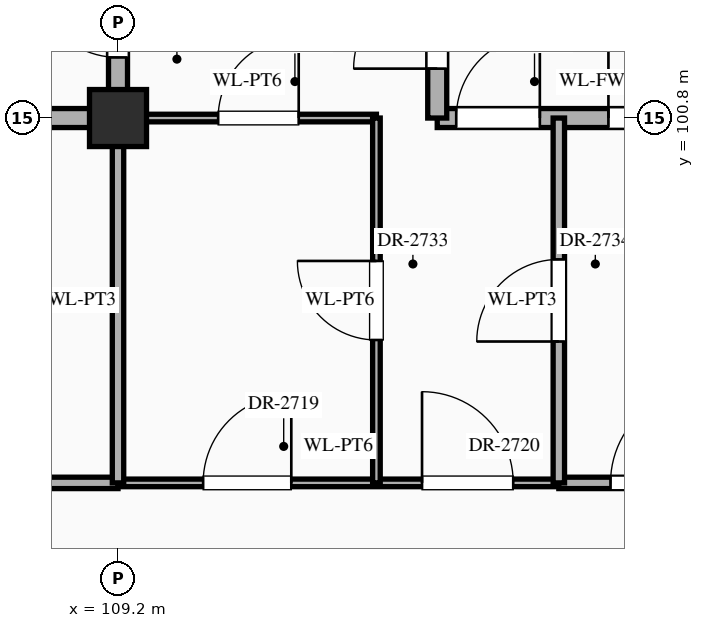
"""IFC4 building model, lengths in metres.
Left out: names, types, materials, properties, quantities, classifications, styles, units other than length and angle.
Written with IfcOpenShell. Run it as: python <this file> out.ifc"""

import sys

from ifc_helpers import new_model, si_unit, direction, frame, frame_2d, origin, origin_2d, place, context, subcontext, project, spatial, rectangle, extrude, element, fill, save


model = new_model("IFC4")
c1 = context("Model", 3, precision=1e-05, world=origin(), true_north=direction((0.0, 1.0)))
c2 = subcontext(c1, "Body", "Model", "MODEL_VIEW")
j1 = project(units=[si_unit("LENGTHUNIT", "METRE"), si_unit("PLANEANGLEUNIT", "RADIAN")], contexts=[c1])
p1 = place(None, origin())
s1 = spatial("IfcSite", under=j1, at=p1, CompositionType="ELEMENT")
p2 = place(p1, origin())
s2 = spatial("IfcBuilding", under=s1, at=p2, CompositionType="ELEMENT")
p3 = place(p2, frame((0.0, 0.0, 39.3)))
s3 = spatial("IfcBuildingStorey", under=s2, at=p3, CompositionType="ELEMENT", Elevation=39.3)
p4 = place(p3, frame((109.2, 100.8, 0.0), z_axis=(0.0, 0.0, 1.0), x_axis=(1.0, 0.0, 0.0)))
e1 = element("IfcColumn", 1, at=p4, inside=s3, PredefinedType="COLUMN", context=c2, shape_type="SweptSolid", body=[
    extrude(rectangle(XDim=0.75, YDim=0.75, at=origin_2d()), origin(), (0.0, 0.0, 1.0), 4.2),
])
p5 = place(p3, frame((89.8, 96.0, 0.0), z_axis=(0.0, 0.0, 1.0), x_axis=(1.0, 0.0, 0.0)))
e2 = element("IfcWall", 2, at=p5, inside=s3, PredefinedType="STANDARD", context=c2, shape_type="SweptSolid", body=[
    extrude(rectangle(XDim=19.4, YDim=0.15, at=frame_2d((9.7, 0.0))), origin(), (0.0, 0.0, 1.0), 3.95),
])
p6 = place(p5, frame((0.78, 0.0, 0.0)))
e3 = element("IfcOpeningElement", 3, at=p6, cuts=e2, PredefinedType="OPENING", context=c2, shape_type="SweptSolid", body=[
    extrude(rectangle(XDim=1.04, YDim=2.2, at=frame_2d((0.52, 1.1))), frame((0.0, 0.087, 0.0), z_axis=(0.0, -1.0, 0.0), x_axis=(1.0, 0.0, 0.0)), (0.0, 0.0, 1.0), 0.174),
])
p7 = place(p5, frame((6.26, 0.0, 0.0)))
e4 = element("IfcOpeningElement", 4, at=p7, cuts=e2, PredefinedType="OPENING", context=c2, shape_type="SweptSolid", body=[
    extrude(rectangle(XDim=1.08, YDim=2.25, at=frame_2d((0.54, 1.125))), frame((0.0, 0.087, 0.0), z_axis=(0.0, -1.0, 0.0), x_axis=(1.0, 0.0, 0.0)), (0.0, 0.0, 1.0), 0.174),
])
p8 = place(p5, frame((14.64, 0.0, 0.0)))
e5 = element("IfcOpeningElement", 5, at=p8, cuts=e2, PredefinedType="OPENING", context=c2, shape_type="SweptSolid", body=[
    extrude(rectangle(XDim=1.12, YDim=2.25, at=frame_2d((0.56, 1.125))), frame((0.0, 0.087, 0.0), z_axis=(0.0, -1.0, 0.0), x_axis=(1.0, 0.0, 0.0)), (0.0, 0.0, 1.0), 0.174),
])
p9 = place(p3, frame((109.2, 96.0, 0.0), z_axis=(0.0, 0.0, 1.0), x_axis=(1.0, 0.0, 0.0)))
e6 = element("IfcWall", 6, at=p9, inside=s3, PredefinedType="STANDARD", context=c2, shape_type="SweptSolid", body=[
    extrude(rectangle(XDim=5.8, YDim=0.1, at=frame_2d((2.9, 0.0))), origin(), (0.0, 0.0, 1.0), 3.95),
])
p10 = place(p9, frame((1.12, 0.0, 0.0)))
e7 = element("IfcOpeningElement", 7, at=p10, cuts=e6, PredefinedType="OPENING", context=c2, shape_type="SweptSolid", body=[
    extrude(rectangle(XDim=1.16, YDim=2.3, at=frame_2d((0.58, 1.15))), frame((0.0, 0.062, 0.0), z_axis=(0.0, -1.0, 0.0), x_axis=(1.0, 0.0, 0.0)), (0.0, 0.0, 1.0), 0.124),
])
p11 = place(p9, frame((4.0, 0.0, 0.0)))
e8 = element("IfcOpeningElement", 8, at=p11, cuts=e6, PredefinedType="OPENING", context=c2, shape_type="SweptSolid", body=[
    extrude(rectangle(XDim=1.2, YDim=2.35, at=frame_2d((0.6, 1.175))), frame((0.0, 0.062, 0.0), z_axis=(0.0, -1.0, 0.0), x_axis=(1.0, 0.0, 0.0)), (0.0, 0.0, 1.0), 0.124),
])
p12 = place(p3, frame((115.0, 96.0, 0.0), z_axis=(0.0, 0.0, 1.0), x_axis=(1.0, 0.0, 0.0)))
e9 = element("IfcWall", 9, at=p12, inside=s3, PredefinedType="STANDARD", context=c2, shape_type="SweptSolid", body=[
    extrude(rectangle(XDim=10.96, YDim=0.15, at=frame_2d((5.48, 0.0))), origin(), (0.0, 0.0, 1.0), 3.95),
])
p13 = place(p12, frame((0.68, 0.0, 0.0)))
e10 = element("IfcOpeningElement", 10, at=p13, cuts=e9, PredefinedType="OPENING", context=c2, shape_type="SweptSolid", body=[
    extrude(rectangle(XDim=1.24, YDim=2.3, at=frame_2d((0.62, 1.15))), frame((0.0, 0.087, 0.0), z_axis=(0.0, -1.0, 0.0), x_axis=(1.0, 0.0, 0.0)), (0.0, 0.0, 1.0), 0.174),
])
p14 = place(p12, frame((6.33, 0.0, 0.0)))
e11 = element("IfcOpeningElement", 11, at=p14, cuts=e9, PredefinedType="OPENING", context=c2, shape_type="SweptSolid", body=[
    extrude(rectangle(XDim=0.9, YDim=2.15, at=frame_2d((0.45, 1.075))), frame((0.0, 0.087, 0.0), z_axis=(0.0, -1.0, 0.0), x_axis=(1.0, 0.0, 0.0)), (0.0, 0.0, 1.0), 0.174),
])
p15 = place(p3, frame((96.6, 100.8, 0.0), z_axis=(0.0, 0.0, 1.0), x_axis=(1.0, 0.0, 0.0)))
e12 = element("IfcWall", 12, at=p15, inside=s3, PredefinedType="STANDARD", context=c2, shape_type="SweptSolid", body=[
    extrude(rectangle(XDim=12.6, YDim=0.25, at=frame_2d((6.3, 0.0))), origin(), (0.0, 0.0, 1.0), 3.1),
])
p16 = place(p15, frame((7.9, 0.0, 0.0)))
e13 = element("IfcOpeningElement", 13, at=p16, cuts=e12, PredefinedType="OPENING", context=c2, shape_type="SweptSolid", body=[
    extrude(rectangle(XDim=1.0, YDim=2.2, at=frame_2d((0.5, 1.1))), frame((0.0, 0.137, 0.0), z_axis=(0.0, -1.0, 0.0), x_axis=(1.0, 0.0, 0.0)), (0.0, 0.0, 1.0), 0.274),
])
p17 = place(p3, frame((109.2, 100.8, 0.0), z_axis=(0.0, 0.0, 1.0), x_axis=(1.0, 0.0, 0.0)))
e14 = element("IfcWall", 14, at=p17, inside=s3, PredefinedType="STANDARD", context=c2, shape_type="SweptSolid", body=[
    extrude(rectangle(XDim=3.4, YDim=0.1, at=frame_2d((1.7, 0.0))), origin(), (0.0, 0.0, 1.0), 3.1),
])
p18 = place(p17, frame((1.317, 0.0, 0.0)))
e15 = element("IfcOpeningElement", 15, at=p18, cuts=e14, PredefinedType="OPENING", context=c2, shape_type="SweptSolid", body=[
    extrude(rectangle(XDim=1.06, YDim=2.4, at=frame_2d((0.53, 1.2))), frame((0.0, 0.062, 0.0), z_axis=(0.0, -1.0, 0.0), x_axis=(1.0, 0.0, 0.0)), (0.0, 0.0, 1.0), 0.124),
])
p19 = place(p3, frame((113.4, 100.8, 0.0), z_axis=(0.0, 0.0, 1.0), x_axis=(1.0, 0.0, 0.0)))
e16 = element("IfcWall", 16, at=p19, inside=s3, PredefinedType="STANDARD", context=c2, shape_type="SweptSolid", body=[
    extrude(rectangle(XDim=4.2, YDim=0.25, at=frame_2d((2.1, 0.0))), origin(), (0.0, 0.0, 1.0), 3.1),
])
p20 = place(p19, frame((0.25, 0.0, 0.0)))
e17 = element("IfcOpeningElement", 17, at=p20, cuts=e16, PredefinedType="OPENING", context=c2, shape_type="SweptSolid", body=[
    extrude(rectangle(XDim=1.1, YDim=2.2, at=frame_2d((0.55, 1.1))), frame((0.0, 0.137, 0.0), z_axis=(0.0, -1.0, 0.0), x_axis=(1.0, 0.0, 0.0)), (0.0, 0.0, 1.0), 0.274),
])
p21 = place(p19, frame((2.252, 0.0, 0.0)))
e18 = element("IfcOpeningElement", 18, at=p21, cuts=e16, PredefinedType="OPENING", context=c2, shape_type="SweptSolid", body=[
    extrude(rectangle(XDim=1.0, YDim=2.2, at=frame_2d((0.5, 1.1))), frame((0.0, 0.137, 0.0), z_axis=(0.0, -1.0, 0.0), x_axis=(1.0, 0.0, 0.0)), (0.0, 0.0, 1.0), 0.274),
])
p22 = place(p3, frame((109.2, 96.0, 0.0), z_axis=(0.0, 0.0, 1.0), x_axis=(0.0, 1.0, 0.0)))
e19 = element("IfcWall", 19, at=p22, inside=s3, PredefinedType="STANDARD", context=c2, shape_type="SweptSolid", body=[
    extrude(rectangle(XDim=4.8, YDim=0.15, at=frame_2d((2.4, 0.0))), origin(), (0.0, 0.0, 1.0), 3.2),
])
p23 = place(p3, frame((109.2, 100.8, 0.0), z_axis=(0.0, 0.0, 1.0), x_axis=(0.0, 1.0, 0.0)))
e20 = element("IfcWall", 20, at=p23, inside=s3, PredefinedType="STANDARD", context=c2, shape_type="SweptSolid", body=[
    extrude(rectangle(XDim=2.4, YDim=0.25, at=frame_2d((1.2, 0.0))), origin(), (0.0, 0.0, 1.0), 3.2),
])
p24 = place(p23, frame((0.798, 0.0, 0.0)))
e21 = element("IfcOpeningElement", 21, at=p24, cuts=e20, PredefinedType="OPENING", context=c2, shape_type="SweptSolid", body=[
    extrude(rectangle(XDim=1.1, YDim=2.2, at=frame_2d((0.55, 1.1))), frame((0.0, 0.137, 0.0), z_axis=(0.0, -1.0, 0.0), x_axis=(1.0, 0.0, 0.0)), (0.0, 0.0, 1.0), 0.274),
])
p25 = place(p3, frame((112.6, 96.0, 0.0), z_axis=(0.0, 0.0, 1.0), x_axis=(0.0, 1.0, 0.0)))
e22 = element("IfcWall", 22, at=p25, inside=s3, PredefinedType="STANDARD", context=c2, shape_type="SweptSolid", body=[
    extrude(rectangle(XDim=4.8, YDim=0.1, at=frame_2d((2.4, 0.0))), origin(), (0.0, 0.0, 1.0), 3.95),
])
p26 = place(p25, frame((1.88, 0.0, 0.0)))
e23 = element("IfcOpeningElement", 23, at=p26, cuts=e22, PredefinedType="OPENING", context=c2, shape_type="SweptSolid", body=[
    extrude(rectangle(XDim=1.04, YDim=2.2, at=frame_2d((0.52, 1.1))), frame((0.0, 0.062, 0.0), z_axis=(0.0, -1.0, 0.0), x_axis=(1.0, 0.0, 0.0)), (0.0, 0.0, 1.0), 0.124),
])
p27 = place(p3, frame((113.4, 100.8, 0.0), z_axis=(0.0, 0.0, 1.0), x_axis=(0.0, 1.0, 0.0)))
e24 = element("IfcWall", 24, at=p27, inside=s3, PredefinedType="STANDARD", context=c2, shape_type="SweptSolid", body=[
    extrude(rectangle(XDim=3.6, YDim=0.25, at=frame_2d((1.8, 0.0))), origin(), (0.0, 0.0, 1.0), 3.95),
])
p28 = place(p27, frame((0.65, 0.0, 0.0)))
e25 = element("IfcOpeningElement", 25, at=p28, cuts=e24, PredefinedType="OPENING", context=c2, shape_type="SweptSolid", body=[
    extrude(rectangle(XDim=1.1, YDim=2.2, at=frame_2d((0.55, 1.1))), frame((0.0, 0.137, 0.0), z_axis=(0.0, -1.0, 0.0), x_axis=(1.0, 0.0, 0.0)), (0.0, 0.0, 1.0), 0.274),
])
p29 = place(p3, frame((115.0, 96.0, 0.0), z_axis=(0.0, 0.0, 1.0), x_axis=(0.0, 1.0, 0.0)))
e26 = element("IfcWall", 26, at=p29, inside=s3, PredefinedType="STANDARD", context=c2, shape_type="SweptSolid", body=[
    extrude(rectangle(XDim=4.8, YDim=0.15, at=frame_2d((2.4, 0.0))), origin(), (0.0, 0.0, 1.0), 3.95),
])
p30 = place(p29, frame((1.86, 0.0, 0.0)))
e27 = element("IfcOpeningElement", 27, at=p30, cuts=e26, PredefinedType="OPENING", context=c2, shape_type="SweptSolid", body=[
    extrude(rectangle(XDim=1.08, YDim=2.25, at=frame_2d((0.54, 1.125))), frame((0.0, 0.087, 0.0), z_axis=(0.0, -1.0, 0.0), x_axis=(1.0, 0.0, 0.0)), (0.0, 0.0, 1.0), 0.174),
])
p31 = place(p24, origin())
e28 = element("IfcDoor", 28, at=p31, inside=s3, OperationType="SINGLE_SWING_RIGHT", PredefinedType="DOOR", context=c2, shape_type="SweptSolid", body=[
    extrude(rectangle(XDim=1.1, YDim=2.2, at=frame_2d((0.55, 1.1))), frame((0.0, 0.025, 0.0), z_axis=(0.0, -1.0, 0.0), x_axis=(1.0, 0.0, 0.0)), (0.0, 0.0, 1.0), 0.05),
])
fill(e21, e28)
p32 = place(p28, origin())
e29 = element("IfcDoor", 29, at=p32, inside=s3, OperationType="SINGLE_SWING_LEFT", PredefinedType="DOOR", context=c2, shape_type="SweptSolid", body=[
    extrude(rectangle(XDim=1.1, YDim=2.2, at=frame_2d((0.55, 1.1))), frame((0.0, 0.025, 0.0), z_axis=(0.0, -1.0, 0.0), x_axis=(1.0, 0.0, 0.0)), (0.0, 0.0, 1.0), 0.05),
])
fill(e25, e29)
p33 = place(p18, origin())
e30 = element("IfcDoor", 30, at=p33, inside=s3, OperationType="SINGLE_SWING_RIGHT", PredefinedType="DOOR", context=c2, shape_type="SweptSolid", body=[
    extrude(rectangle(XDim=1.06, YDim=2.4, at=frame_2d((0.53, 1.2))), frame((0.0, 0.025, 0.0), z_axis=(0.0, -1.0, 0.0), x_axis=(1.0, 0.0, 0.0)), (0.0, 0.0, 1.0), 0.05),
])
fill(e15, e30)
p34 = place(p20, origin())
e31 = element("IfcDoor", 31, at=p34, inside=s3, OperationType="SINGLE_SWING_RIGHT", PredefinedType="DOOR", context=c2, shape_type="SweptSolid", body=[
    extrude(rectangle(XDim=1.1, YDim=2.2, at=frame_2d((0.55, 1.1))), frame((0.0, 0.025, 0.0), z_axis=(0.0, -1.0, 0.0), x_axis=(1.0, 0.0, 0.0)), (0.0, 0.0, 1.0), 0.05),
])
fill(e17, e31)
p35 = place(p21, origin())
e32 = element("IfcDoor", 32, at=p35, inside=s3, OperationType="SINGLE_SWING_LEFT", PredefinedType="DOOR", context=c2, shape_type="SweptSolid", body=[
    extrude(rectangle(XDim=1.0, YDim=2.2, at=frame_2d((0.5, 1.1))), frame((0.0, 0.025, 0.0), z_axis=(0.0, -1.0, 0.0), x_axis=(1.0, 0.0, 0.0)), (0.0, 0.0, 1.0), 0.05),
])
fill(e18, e32)
p36 = place(p10, origin())
e33 = element("IfcDoor", 33, at=p36, inside=s3, OperationType="SINGLE_SWING_RIGHT", PredefinedType="DOOR", context=c2, shape_type="SweptSolid", body=[
    extrude(rectangle(XDim=1.16, YDim=2.3, at=frame_2d((0.58, 1.15))), frame((0.0, 0.025, 0.0), z_axis=(0.0, -1.0, 0.0), x_axis=(1.0, 0.0, 0.0)), (0.0, 0.0, 1.0), 0.05),
])
fill(e7, e33)
p37 = place(p11, origin())
e34 = element("IfcDoor", 34, at=p37, inside=s3, OperationType="SINGLE_SWING_LEFT", PredefinedType="DOOR", context=c2, shape_type="SweptSolid", body=[
    extrude(rectangle(XDim=1.2, YDim=2.35, at=frame_2d((0.6, 1.175))), frame((0.0, 0.025, 0.0), z_axis=(0.0, -1.0, 0.0), x_axis=(1.0, 0.0, 0.0)), (0.0, 0.0, 1.0), 0.05),
])
fill(e8, e34)
p38 = place(p13, origin())
e35 = element("IfcDoor", 35, at=p38, inside=s3, OperationType="SINGLE_SWING_RIGHT", PredefinedType="DOOR", context=c2, shape_type="SweptSolid", body=[
    extrude(rectangle(XDim=1.24, YDim=2.3, at=frame_2d((0.62, 1.15))), frame((0.0, 0.025, 0.0), z_axis=(0.0, -1.0, 0.0), x_axis=(1.0, 0.0, 0.0)), (0.0, 0.0, 1.0), 0.05),
])
fill(e10, e35)
p39 = place(p26, origin())
e36 = element("IfcDoor", 36, at=p39, inside=s3, OperationType="SINGLE_SWING_RIGHT", PredefinedType="DOOR", context=c2, shape_type="SweptSolid", body=[
    extrude(rectangle(XDim=1.04, YDim=2.2, at=frame_2d((0.52, 1.1))), frame((0.0, 0.025, 0.0), z_axis=(0.0, -1.0, 0.0), x_axis=(1.0, 0.0, 0.0)), (0.0, 0.0, 1.0), 0.05),
])
fill(e23, e36)
p40 = place(p30, origin())
e37 = element("IfcDoor", 37, at=p40, inside=s3, OperationType="SINGLE_SWING_LEFT", PredefinedType="DOOR", context=c2, shape_type="SweptSolid", body=[
    extrude(rectangle(XDim=1.08, YDim=2.25, at=frame_2d((0.54, 1.125))), frame((0.0, 0.025, 0.0), z_axis=(0.0, -1.0, 0.0), x_axis=(1.0, 0.0, 0.0)), (0.0, 0.0, 1.0), 0.05),
])
fill(e27, e37)
save(model, sys.argv[1])
